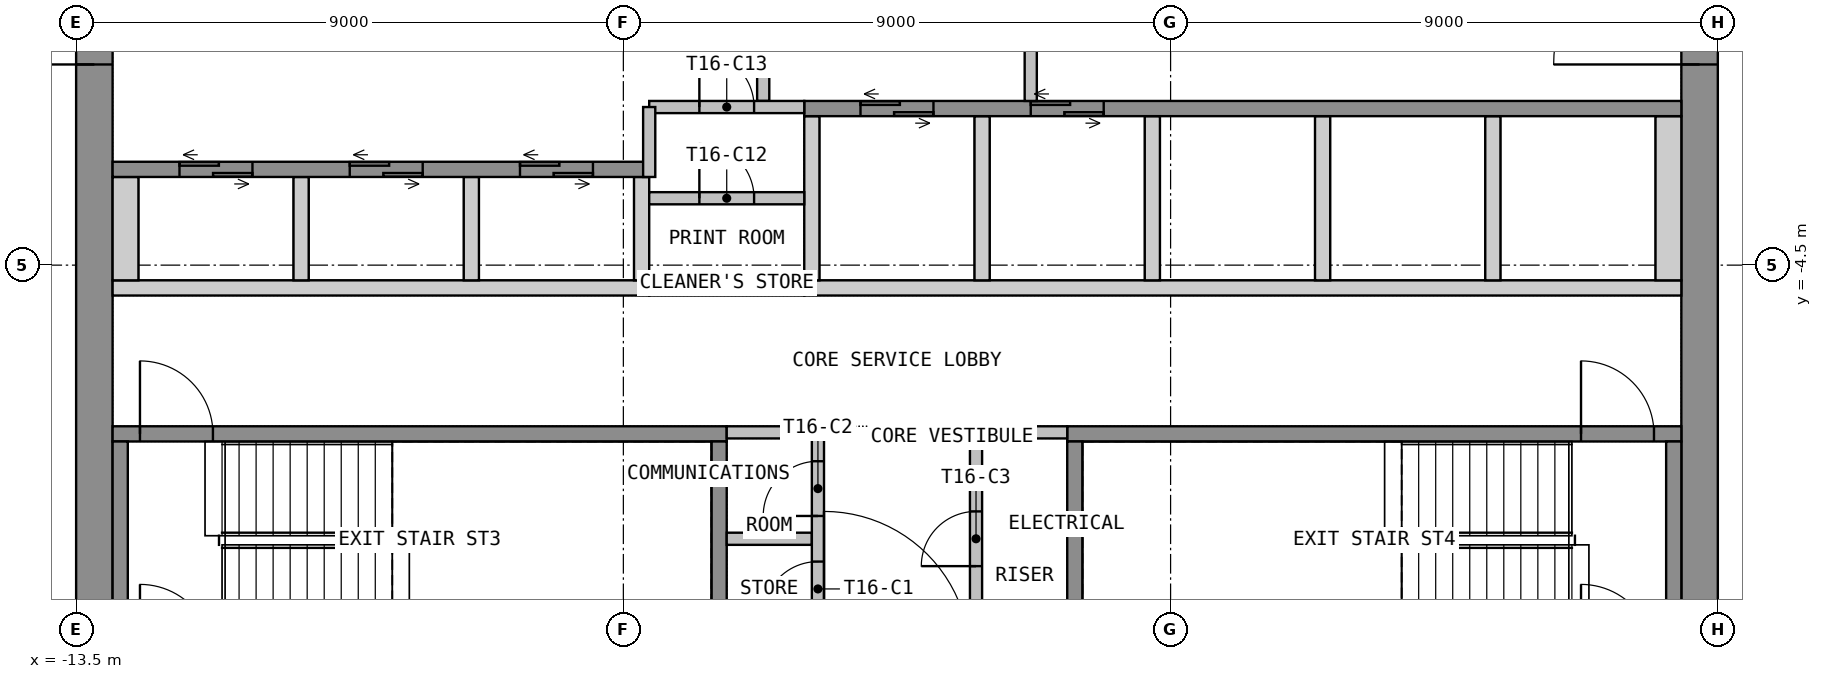
"""IFC4 building model, lengths in metres.
Left out: names, types, materials, properties, quantities, classifications, styles, units other than length and angle.
Written with IfcOpenShell. Run it as: python <this file> out.ifc"""

import sys

from ifc_helpers import new_model, si_unit, direction, frame, frame_2d, origin, place, context, subcontext, project, spatial, polyline, rectangle, outline, extrude, element, fill, save


model = new_model("IFC4")
c1 = context("Model", 3, precision=1e-05, world=origin(), true_north=direction((0.0, 1.0)))
c2 = subcontext(c1, "Body", "Model", "MODEL_VIEW")
j1 = project(units=[si_unit("LENGTHUNIT", "METRE"), si_unit("PLANEANGLEUNIT", "RADIAN")], contexts=[c1])
p1 = place(None, origin())
s1 = spatial("IfcSite", under=j1, at=p1, CompositionType="ELEMENT")
p2 = place(p1, origin())
s2 = spatial("IfcBuilding", under=s1, at=p2, CompositionType="ELEMENT")
p3 = place(p2, frame((0.0, 0.0, 219.0)))
s3 = spatial("IfcBuildingStorey", under=s2, at=p3, CompositionType="ELEMENT", Elevation=219.0)
p4 = place(p3, frame((-13.2, -10.65, 0.0), z_axis=(0.0, 0.0, 1.0), x_axis=(0.0, 1.0, 0.0)))
e1 = element("IfcWall", 1, at=p4, inside=s3, PredefinedType="SHEAR", context=c2, shape_type="SweptSolid", body=[
    extrude(rectangle(XDim=21.3, YDim=0.6, at=frame_2d((10.65, 0.0))), origin(), (0.0, 0.0, 1.0), 3.55),
])
p5 = place(p4, frame((9.45, 0.0, 0.0)))
e2 = element("IfcOpeningElement", 2, at=p5, cuts=e1, PredefinedType="OPENING", context=c2, shape_type="SweptSolid", body=[
    extrude(rectangle(XDim=2.4, YDim=2.1, at=frame_2d((1.2, 1.05))), frame((0.0, 0.31, 0.0), z_axis=(0.0, -1.0, 0.0), x_axis=(1.0, 0.0, 0.0)), (0.0, 0.0, 1.0), 0.62),
])
p6 = place(p3, frame((13.2, -10.65, 0.0), z_axis=(0.0, 0.0, 1.0), x_axis=(0.0, 1.0, 0.0)))
e3 = element("IfcWall", 3, at=p6, inside=s3, PredefinedType="SHEAR", context=c2, shape_type="SweptSolid", body=[
    extrude(rectangle(XDim=21.3, YDim=0.6, at=frame_2d((10.65, 0.0))), origin(), (0.0, 0.0, 1.0), 3.55),
])
p7 = place(p6, frame((9.45, 0.0, 0.0)))
e4 = element("IfcOpeningElement", 4, at=p7, cuts=e3, PredefinedType="OPENING", context=c2, shape_type="SweptSolid", body=[
    extrude(rectangle(XDim=2.4, YDim=2.1, at=frame_2d((1.2, 1.05))), frame((0.0, 0.31, 0.0), z_axis=(0.0, -1.0, 0.0), x_axis=(1.0, 0.0, 0.0)), (0.0, 0.0, 1.0), 0.62),
])
p8 = place(p3, origin())
e5 = element("IfcWall", 5, at=p8, inside=s3, PredefinedType="SHEAR", context=c2, shape_type="SweptSolid", body=[
    extrude(outline(polyline([(-12.9, -5.0), (-4.075, -5.0), (-4.075, -4.75), (-12.9, -4.75), (-12.9, -5.0)])), origin(), (0.0, 0.0, 1.0), 3.55),
])
p9 = place(p3, origin())
e6 = element("IfcWall", 6, at=p9, inside=s3, PredefinedType="SHEAR", context=c2, shape_type="SweptSolid", body=[
    extrude(outline(polyline([(-1.525, -5.0), (12.9, -5.0), (12.9, -4.75), (-1.525, -4.75), (-1.525, -5.0)])), origin(), (0.0, 0.0, 1.0), 3.55),
])
p10 = place(p3, origin())
e7 = element("IfcWall", 7, at=p10, inside=s3, PredefinedType="SHEAR", context=c2, shape_type="SweptSolid", body=[
    extrude(outline(polyline([(-12.9, -4.75), (-12.475, -4.75), (-12.475, -3.05), (-12.9, -3.05), (-12.9, -4.75)])), origin(), (0.0, 0.0, 1.0), 3.55),
])
p11 = place(p3, origin())
e8 = element("IfcWall", 8, at=p11, inside=s3, PredefinedType="SHEAR", context=c2, shape_type="SweptSolid", body=[
    extrude(outline(polyline([(-9.925, -4.75), (-9.675, -4.75), (-9.675, -3.05), (-9.925, -3.05), (-9.925, -4.75)])), origin(), (0.0, 0.0, 1.0), 3.55),
])
p12 = place(p3, origin())
e9 = element("IfcWall", 9, at=p12, inside=s3, PredefinedType="SHEAR", context=c2, shape_type="SweptSolid", body=[
    extrude(outline(polyline([(-7.125, -4.75), (-6.875, -4.75), (-6.875, -3.05), (-7.125, -3.05), (-7.125, -4.75)])), origin(), (0.0, 0.0, 1.0), 3.55),
])
p13 = place(p3, origin())
e10 = element("IfcWall", 10, at=p13, inside=s3, PredefinedType="SHEAR", context=c2, shape_type="SweptSolid", body=[
    extrude(outline(polyline([(-4.325, -4.75), (-4.075, -4.75), (-4.075, -3.05), (-4.325, -3.05), (-4.325, -4.75)])), origin(), (0.0, 0.0, 1.0), 3.55),
])
p14 = place(p3, origin())
e11 = element("IfcWall", 11, at=p14, inside=s3, PredefinedType="SHEAR", context=c2, shape_type="SweptSolid", body=[
    extrude(outline(polyline([(-1.525, -4.75), (-1.275, -4.75), (-1.275, -2.05), (-1.525, -2.05), (-1.525, -4.75)])), origin(), (0.0, 0.0, 1.0), 3.55),
])
p15 = place(p3, origin())
e12 = element("IfcWall", 12, at=p15, inside=s3, PredefinedType="SHEAR", context=c2, shape_type="SweptSolid", body=[
    extrude(outline(polyline([(1.275, -4.75), (1.525, -4.75), (1.525, -2.05), (1.275, -2.05), (1.275, -4.75)])), origin(), (0.0, 0.0, 1.0), 3.55),
])
p16 = place(p3, origin())
e13 = element("IfcWall", 13, at=p16, inside=s3, PredefinedType="SHEAR", context=c2, shape_type="SweptSolid", body=[
    extrude(outline(polyline([(4.075, -4.75), (4.325, -4.75), (4.325, -2.05), (4.075, -2.05), (4.075, -4.75)])), origin(), (0.0, 0.0, 1.0), 3.55),
])
p17 = place(p3, origin())
e14 = element("IfcWall", 14, at=p17, inside=s3, PredefinedType="SHEAR", context=c2, shape_type="SweptSolid", body=[
    extrude(outline(polyline([(6.875, -4.75), (7.125, -4.75), (7.125, -2.05), (6.875, -2.05), (6.875, -4.75)])), origin(), (0.0, 0.0, 1.0), 3.55),
])
p18 = place(p3, origin())
e15 = element("IfcWall", 15, at=p18, inside=s3, PredefinedType="SHEAR", context=c2, shape_type="SweptSolid", body=[
    extrude(outline(polyline([(9.675, -4.75), (9.925, -4.75), (9.925, -2.05), (9.675, -2.05), (9.675, -4.75)])), origin(), (0.0, 0.0, 1.0), 3.55),
])
p19 = place(p3, origin())
e16 = element("IfcWall", 16, at=p19, inside=s3, PredefinedType="SHEAR", context=c2, shape_type="SweptSolid", body=[
    extrude(outline(polyline([(12.475, -4.75), (12.9, -4.75), (12.9, -2.05), (12.475, -2.05), (12.475, -4.75)])), origin(), (0.0, 0.0, 1.0), 3.55),
])
p20 = place(p3, frame((-12.9, -2.925, 0.0), z_axis=(0.0, 0.0, 1.0), x_axis=(1.0, 0.0, 0.0)))
e17 = element("IfcWall", 17, at=p20, inside=s3, PredefinedType="SHEAR", context=c2, shape_type="SweptSolid", body=[
    extrude(rectangle(XDim=8.825, YDim=0.25, at=frame_2d((4.413, 0.0))), origin(), (0.0, 0.0, 1.0), 3.55),
])
p21 = place(p20, frame((1.1, 0.0, 0.0)))
e18 = element("IfcOpeningElement", 18, at=p21, cuts=e17, PredefinedType="OPENING", context=c2, shape_type="SweptSolid", body=[
    extrude(rectangle(XDim=1.2, YDim=2.1, at=frame_2d((0.6, 1.05))), frame((0.0, 0.135, 0.0), z_axis=(0.0, -1.0, 0.0), x_axis=(1.0, 0.0, 0.0)), (0.0, 0.0, 1.0), 0.27),
])
p22 = place(p20, frame((3.9, 0.0, 0.0)))
e19 = element("IfcOpeningElement", 19, at=p22, cuts=e17, PredefinedType="OPENING", context=c2, shape_type="SweptSolid", body=[
    extrude(rectangle(XDim=1.2, YDim=2.1, at=frame_2d((0.6, 1.05))), frame((0.0, 0.135, 0.0), z_axis=(0.0, -1.0, 0.0), x_axis=(1.0, 0.0, 0.0)), (0.0, 0.0, 1.0), 0.27),
])
p23 = place(p20, frame((6.7, 0.0, 0.0)))
e20 = element("IfcOpeningElement", 20, at=p23, cuts=e17, PredefinedType="OPENING", context=c2, shape_type="SweptSolid", body=[
    extrude(rectangle(XDim=1.2, YDim=2.1, at=frame_2d((0.6, 1.05))), frame((0.0, 0.135, 0.0), z_axis=(0.0, -1.0, 0.0), x_axis=(1.0, 0.0, 0.0)), (0.0, 0.0, 1.0), 0.27),
])
p24 = place(p3, frame((-1.525, -1.925, 0.0), z_axis=(0.0, 0.0, 1.0), x_axis=(1.0, 0.0, 0.0)))
e21 = element("IfcWall", 21, at=p24, inside=s3, PredefinedType="SHEAR", context=c2, shape_type="SweptSolid", body=[
    extrude(rectangle(XDim=14.425, YDim=0.25, at=frame_2d((7.212, 0.0))), origin(), (0.0, 0.0, 1.0), 3.55),
])
p25 = place(p24, frame((0.925, 0.0, 0.0)))
e22 = element("IfcOpeningElement", 22, at=p25, cuts=e21, PredefinedType="OPENING", context=c2, shape_type="SweptSolid", body=[
    extrude(rectangle(XDim=1.2, YDim=2.1, at=frame_2d((0.6, 1.05))), frame((0.0, 0.135, 0.0), z_axis=(0.0, -1.0, 0.0), x_axis=(1.0, 0.0, 0.0)), (0.0, 0.0, 1.0), 0.27),
])
p26 = place(p24, frame((3.725, 0.0, 0.0)))
e23 = element("IfcOpeningElement", 23, at=p26, cuts=e21, PredefinedType="OPENING", context=c2, shape_type="SweptSolid", body=[
    extrude(rectangle(XDim=1.2, YDim=2.1, at=frame_2d((0.6, 1.05))), frame((0.0, 0.135, 0.0), z_axis=(0.0, -1.0, 0.0), x_axis=(1.0, 0.0, 0.0)), (0.0, 0.0, 1.0), 0.27),
])
p27 = place(p3, frame((-2.2, -1.8, 0.0), z_axis=(0.0, 0.0, 1.0), x_axis=(0.0, 1.0, 0.0)))
e24 = element("IfcWall", 24, at=p27, inside=s3, PredefinedType="PARTITIONING", context=c2, shape_type="SweptSolid", body=[
    extrude(rectangle(XDim=3.6, YDim=0.2, at=frame_2d((1.8, 0.0))), origin(), (0.0, 0.0, 1.0), 3.55),
])
p28 = place(p27, frame((1.2, 0.0, 0.0)))
e25 = element("IfcOpeningElement", 25, at=p28, cuts=e24, PredefinedType="OPENING", context=c2, shape_type="SweptSolid", body=[
    extrude(rectangle(XDim=1.2, YDim=2.1, at=frame_2d((0.6, 1.05))), frame((0.0, 0.11, 0.0), z_axis=(0.0, -1.0, 0.0), x_axis=(1.0, 0.0, 0.0)), (0.0, 0.0, 1.0), 0.22),
])
p29 = place(p3, frame((2.2, -1.8, 0.0), z_axis=(0.0, 0.0, 1.0), x_axis=(0.0, 1.0, 0.0)))
e26 = element("IfcWall", 26, at=p29, inside=s3, PredefinedType="PARTITIONING", context=c2, shape_type="SweptSolid", body=[
    extrude(rectangle(XDim=3.6, YDim=0.2, at=frame_2d((1.8, 0.0))), origin(), (0.0, 0.0, 1.0), 3.55),
])
p30 = place(p29, frame((1.2, 0.0, 0.0)))
e27 = element("IfcOpeningElement", 27, at=p30, cuts=e26, PredefinedType="OPENING", context=c2, shape_type="SweptSolid", body=[
    extrude(rectangle(XDim=1.2, YDim=2.1, at=frame_2d((0.6, 1.05))), frame((0.0, 0.11, 0.0), z_axis=(0.0, -1.0, 0.0), x_axis=(1.0, 0.0, 0.0)), (0.0, 0.0, 1.0), 0.22),
])
p31 = place(p3, frame((-12.9, -7.275, 0.0), z_axis=(0.0, 0.0, 1.0), x_axis=(1.0, 0.0, 0.0)))
e28 = element("IfcWall", 28, at=p31, inside=s3, PredefinedType="SHEAR", context=c2, shape_type="SweptSolid", body=[
    extrude(rectangle(XDim=10.1, YDim=0.25, at=frame_2d((5.05, 0.0))), origin(), (0.0, 0.0, 1.0), 3.55),
])
p32 = place(p31, frame((0.45, 0.0, 0.0)))
e29 = element("IfcOpeningElement", 29, at=p32, cuts=e28, PredefinedType="OPENING", context=c2, shape_type="SweptSolid", body=[
    extrude(rectangle(XDim=1.2, YDim=2.1, at=frame_2d((0.6, 1.05))), frame((0.0, 0.135, 0.0), z_axis=(0.0, -1.0, 0.0), x_axis=(1.0, 0.0, 0.0)), (0.0, 0.0, 1.0), 0.27),
])
for number, where, z_axis, x_axis in (
    (30, (-12.775, -10.65, 0.0), (0.0, 0.0, 1.0), (0.0, 1.0, 0.0)),
    (31, (-2.925, -10.65, 0.0), (0.0, 0.0, 1.0), (0.0, 1.0, 0.0)),
):
    element("IfcWall", number, at=place(p3, frame(where, z_axis=z_axis, x_axis=x_axis)), inside=s3, PredefinedType="SHEAR", context=c2, shape_type="SweptSolid", body=[
        extrude(rectangle(XDim=3.25, YDim=0.25, at=frame_2d((1.625, 0.0))), origin(), (0.0, 0.0, 1.0), 3.55),
    ])
p33 = place(p3, frame((2.8, -7.275, 0.0), z_axis=(0.0, 0.0, 1.0), x_axis=(1.0, 0.0, 0.0)))
e32 = element("IfcWall", 32, at=p33, inside=s3, PredefinedType="SHEAR", context=c2, shape_type="SweptSolid", body=[
    extrude(rectangle(XDim=10.1, YDim=0.25, at=frame_2d((5.05, 0.0))), origin(), (0.0, 0.0, 1.0), 3.55),
])
p34 = place(p33, frame((8.45, 0.0, 0.0)))
e33 = element("IfcOpeningElement", 33, at=p34, cuts=e32, PredefinedType="OPENING", context=c2, shape_type="SweptSolid", body=[
    extrude(rectangle(XDim=1.2, YDim=2.1, at=frame_2d((0.6, 1.05))), frame((0.0, 0.135, 0.0), z_axis=(0.0, -1.0, 0.0), x_axis=(1.0, 0.0, 0.0)), (0.0, 0.0, 1.0), 0.27),
])
for number, where, z_axis, x_axis in (
    (34, (2.925, -10.65, 0.0), (0.0, 0.0, 1.0), (0.0, 1.0, 0.0)),
    (35, (12.775, -10.65, 0.0), (0.0, 0.0, 1.0), (0.0, 1.0, 0.0)),
):
    element("IfcWall", number, at=place(p3, frame(where, z_axis=z_axis, x_axis=x_axis)), inside=s3, PredefinedType="SHEAR", context=c2, shape_type="SweptSolid", body=[
        extrude(rectangle(XDim=3.25, YDim=0.25, at=frame_2d((1.625, 0.0))), origin(), (0.0, 0.0, 1.0), 3.55),
    ])
for number, where, z_axis, x_axis in (
    (36, (-2.8, -7.25, 0.0), (0.0, 0.0, 1.0), (1.0, 0.0, 0.0)),
    (37, (-2.8, -9.0, 0.0), (0.0, 0.0, 1.0), (1.0, 0.0, 0.0)),
    (38, (1.4, -7.25, 0.0), (0.0, 0.0, 1.0), (1.0, 0.0, 0.0)),
):
    element("IfcWall", number, at=place(p3, frame(where, z_axis=z_axis, x_axis=x_axis)), inside=s3, PredefinedType="PARTITIONING", context=c2, shape_type="SweptSolid", body=[
        extrude(rectangle(XDim=1.4, YDim=0.2, at=frame_2d((0.7, 0.0))), origin(), (0.0, 0.0, 1.0), 3.55),
    ])
p35 = place(p3, frame((-1.3, -10.65, 0.0), z_axis=(0.0, 0.0, 1.0), x_axis=(0.0, 1.0, 0.0)))
e39 = element("IfcWall", 39, at=p35, inside=s3, PredefinedType="PARTITIONING", context=c2, shape_type="SweptSolid", body=[
    extrude(rectangle(XDim=3.5, YDim=0.2, at=frame_2d((1.75, 0.0))), origin(), (0.0, 0.0, 1.0), 3.55),
])
p36 = place(p35, frame((0.375, 0.0, 0.0)))
e40 = element("IfcOpeningElement", 40, at=p36, cuts=e39, PredefinedType="OPENING", context=c2, shape_type="SweptSolid", body=[
    extrude(rectangle(XDim=0.9, YDim=2.1, at=frame_2d((0.45, 1.05))), frame((0.0, 0.11, 0.0), z_axis=(0.0, -1.0, 0.0), x_axis=(1.0, 0.0, 0.0)), (0.0, 0.0, 1.0), 0.22),
])
p37 = place(p35, frame((2.025, 0.0, 0.0)))
e41 = element("IfcOpeningElement", 41, at=p37, cuts=e39, PredefinedType="OPENING", context=c2, shape_type="SweptSolid", body=[
    extrude(rectangle(XDim=0.9, YDim=2.1, at=frame_2d((0.45, 1.05))), frame((0.0, 0.11, 0.0), z_axis=(0.0, -1.0, 0.0), x_axis=(1.0, 0.0, 0.0)), (0.0, 0.0, 1.0), 0.22),
])
p38 = place(p3, frame((1.3, -10.65, 0.0), z_axis=(0.0, 0.0, 1.0), x_axis=(0.0, 1.0, 0.0)))
e42 = element("IfcWall", 42, at=p38, inside=s3, PredefinedType="PARTITIONING", context=c2, shape_type="SweptSolid", body=[
    extrude(rectangle(XDim=3.5, YDim=0.2, at=frame_2d((1.75, 0.0))), origin(), (0.0, 0.0, 1.0), 3.55),
])
p39 = place(p38, frame((1.2, 0.0, 0.0)))
e43 = element("IfcOpeningElement", 43, at=p39, cuts=e42, PredefinedType="OPENING", context=c2, shape_type="SweptSolid", body=[
    extrude(rectangle(XDim=0.9, YDim=2.1, at=frame_2d((0.45, 1.05))), frame((0.0, 0.11, 0.0), z_axis=(0.0, -1.0, 0.0), x_axis=(1.0, 0.0, 0.0)), (0.0, 0.0, 1.0), 0.22),
])
p40 = place(p3, frame((-4.075, -3.4, 0.0), z_axis=(0.0, 0.0, 1.0), x_axis=(1.0, 0.0, 0.0)))
e44 = element("IfcWall", 44, at=p40, inside=s3, PredefinedType="PARTITIONING", context=c2, shape_type="SweptSolid", body=[
    extrude(rectangle(XDim=2.55, YDim=0.2, at=frame_2d((1.275, 0.0))), origin(), (0.0, 0.0, 1.0), 3.55),
])
p41 = place(p40, frame((0.825, 0.0, 0.0)))
e45 = element("IfcOpeningElement", 45, at=p41, cuts=e44, PredefinedType="OPENING", context=c2, shape_type="SweptSolid", body=[
    extrude(rectangle(XDim=0.9, YDim=2.1, at=frame_2d((0.45, 1.05))), frame((0.0, 0.11, 0.0), z_axis=(0.0, -1.0, 0.0), x_axis=(1.0, 0.0, 0.0)), (0.0, 0.0, 1.0), 0.22),
])
p42 = place(p3, frame((-4.075, -1.9, 0.0), z_axis=(0.0, 0.0, 1.0), x_axis=(1.0, 0.0, 0.0)))
e46 = element("IfcWall", 46, at=p42, inside=s3, PredefinedType="PARTITIONING", context=c2, shape_type="SweptSolid", body=[
    extrude(rectangle(XDim=2.55, YDim=0.2, at=frame_2d((1.275, 0.0))), origin(), (0.0, 0.0, 1.0), 3.55),
])
p43 = place(p42, frame((0.825, 0.0, 0.0)))
e47 = element("IfcOpeningElement", 47, at=p43, cuts=e46, PredefinedType="OPENING", context=c2, shape_type="SweptSolid", body=[
    extrude(rectangle(XDim=0.9, YDim=2.1, at=frame_2d((0.45, 1.05))), frame((0.0, 0.11, 0.0), z_axis=(0.0, -1.0, 0.0), x_axis=(1.0, 0.0, 0.0)), (0.0, 0.0, 1.0), 0.22),
])
p44 = place(p3, frame((-4.075, -4.9, 0.0), z_axis=(0.0, 0.0, 1.0), x_axis=(1.0, 0.0, 0.0)))
e48 = element("IfcWall", 48, at=p44, inside=s3, PredefinedType="PARTITIONING", context=c2, shape_type="SweptSolid", body=[
    extrude(rectangle(XDim=2.55, YDim=0.2, at=frame_2d((1.275, 0.0))), origin(), (0.0, 0.0, 1.0), 3.55),
])
p45 = place(p3, frame((-4.075, -1.9, 0.0), z_axis=(0.0, 0.0, 1.0), x_axis=(0.0, -1.0, 0.0)))
e49 = element("IfcWall", 49, at=p45, inside=s3, PredefinedType="PARTITIONING", context=c2, shape_type="SweptSolid", body=[
    extrude(rectangle(XDim=1.15, YDim=0.2, at=frame_2d((0.575, 0.0))), origin(), (0.0, 0.0, 1.0), 3.55),
])
p46 = place(p5, origin())
e50 = element("IfcDoor", 50, at=p46, inside=s3, OperationType="DOUBLE_DOOR_DOUBLE_SWING", PredefinedType="DOOR", context=c2, shape_type="SweptSolid", body=[
    extrude(rectangle(XDim=2.4, YDim=2.1, at=frame_2d((1.2, 1.05))), frame((0.0, 0.025, 0.0), z_axis=(0.0, -1.0, 0.0), x_axis=(1.0, 0.0, 0.0)), (0.0, 0.0, 1.0), 0.05),
])
fill(e2, e50)
p47 = place(p7, origin())
e51 = element("IfcDoor", 51, at=p47, inside=s3, OperationType="DOUBLE_DOOR_DOUBLE_SWING", PredefinedType="DOOR", context=c2, shape_type="SweptSolid", body=[
    extrude(rectangle(XDim=2.4, YDim=2.1, at=frame_2d((1.2, 1.05))), frame((0.0, 0.025, 0.0), z_axis=(0.0, -1.0, 0.0), x_axis=(1.0, 0.0, 0.0)), (0.0, 0.0, 1.0), 0.05),
])
fill(e4, e51)
p48 = place(p21, origin())
e52 = element("IfcDoor", 52, at=p48, inside=s3, OperationType="DOUBLE_DOOR_SLIDING", PredefinedType="DOOR", context=c2, shape_type="SweptSolid", body=[
    extrude(rectangle(XDim=1.2, YDim=2.1, at=frame_2d((0.6, 1.05))), frame((0.0, 0.025, 0.0), z_axis=(0.0, -1.0, 0.0), x_axis=(1.0, 0.0, 0.0)), (0.0, 0.0, 1.0), 0.05),
])
fill(e18, e52)
p49 = place(p22, origin())
e53 = element("IfcDoor", 53, at=p49, inside=s3, OperationType="DOUBLE_DOOR_SLIDING", PredefinedType="DOOR", context=c2, shape_type="SweptSolid", body=[
    extrude(rectangle(XDim=1.2, YDim=2.1, at=frame_2d((0.6, 1.05))), frame((0.0, 0.025, 0.0), z_axis=(0.0, -1.0, 0.0), x_axis=(1.0, 0.0, 0.0)), (0.0, 0.0, 1.0), 0.05),
])
fill(e19, e53)
p50 = place(p23, origin())
e54 = element("IfcDoor", 54, at=p50, inside=s3, OperationType="DOUBLE_DOOR_SLIDING", PredefinedType="DOOR", context=c2, shape_type="SweptSolid", body=[
    extrude(rectangle(XDim=1.2, YDim=2.1, at=frame_2d((0.6, 1.05))), frame((0.0, 0.025, 0.0), z_axis=(0.0, -1.0, 0.0), x_axis=(1.0, 0.0, 0.0)), (0.0, 0.0, 1.0), 0.05),
])
fill(e20, e54)
p51 = place(p25, origin())
e55 = element("IfcDoor", 55, at=p51, inside=s3, OperationType="DOUBLE_DOOR_SLIDING", PredefinedType="DOOR", context=c2, shape_type="SweptSolid", body=[
    extrude(rectangle(XDim=1.2, YDim=2.1, at=frame_2d((0.6, 1.05))), frame((0.0, 0.025, 0.0), z_axis=(0.0, -1.0, 0.0), x_axis=(1.0, 0.0, 0.0)), (0.0, 0.0, 1.0), 0.05),
])
fill(e22, e55)
p52 = place(p26, origin())
e56 = element("IfcDoor", 56, at=p52, inside=s3, OperationType="DOUBLE_DOOR_SLIDING", PredefinedType="DOOR", context=c2, shape_type="SweptSolid", body=[
    extrude(rectangle(XDim=1.2, YDim=2.1, at=frame_2d((0.6, 1.05))), frame((0.0, 0.025, 0.0), z_axis=(0.0, -1.0, 0.0), x_axis=(1.0, 0.0, 0.0)), (0.0, 0.0, 1.0), 0.05),
])
fill(e23, e56)
p53 = place(p32, origin())
e57 = element("IfcDoor", 57, at=p53, inside=s3, OperationType="SINGLE_SWING_LEFT", PredefinedType="DOOR", context=c2, shape_type="SweptSolid", body=[
    extrude(rectangle(XDim=1.2, YDim=2.1, at=frame_2d((0.6, 1.05))), frame((0.0, 0.025, 0.0), z_axis=(0.0, -1.0, 0.0), x_axis=(1.0, 0.0, 0.0)), (0.0, 0.0, 1.0), 0.05),
])
fill(e29, e57)
p54 = place(p34, origin())
e58 = element("IfcDoor", 58, at=p54, inside=s3, OperationType="SINGLE_SWING_LEFT", PredefinedType="DOOR", context=c2, shape_type="SweptSolid", body=[
    extrude(rectangle(XDim=1.2, YDim=2.1, at=frame_2d((0.6, 1.05))), frame((0.0, 0.025, 0.0), z_axis=(0.0, -1.0, 0.0), x_axis=(1.0, 0.0, 0.0)), (0.0, 0.0, 1.0), 0.05),
])
fill(e33, e58)
p55 = place(p36, origin())
e59 = element("IfcDoor", 59, at=p55, inside=s3, OperationType="SINGLE_SWING_LEFT", PredefinedType="DOOR", context=c2, shape_type="SweptSolid", body=[
    extrude(rectangle(XDim=0.9, YDim=2.1, at=frame_2d((0.45, 1.05))), frame((0.0, 0.025, 0.0), z_axis=(0.0, -1.0, 0.0), x_axis=(1.0, 0.0, 0.0)), (0.0, 0.0, 1.0), 0.05),
])
fill(e40, e59)
p56 = place(p37, origin())
e60 = element("IfcDoor", 60, at=p56, inside=s3, OperationType="SINGLE_SWING_LEFT", PredefinedType="DOOR", context=c2, shape_type="SweptSolid", body=[
    extrude(rectangle(XDim=0.9, YDim=2.1, at=frame_2d((0.45, 1.05))), frame((0.0, 0.025, 0.0), z_axis=(0.0, -1.0, 0.0), x_axis=(1.0, 0.0, 0.0)), (0.0, 0.0, 1.0), 0.05),
])
fill(e41, e60)
p57 = place(p39, origin())
e61 = element("IfcDoor", 61, at=p57, inside=s3, OperationType="SINGLE_SWING_LEFT", PredefinedType="DOOR", context=c2, shape_type="SweptSolid", body=[
    extrude(rectangle(XDim=0.9, YDim=2.1, at=frame_2d((0.45, 1.05))), frame((0.0, 0.025, 0.0), z_axis=(0.0, -1.0, 0.0), x_axis=(1.0, 0.0, 0.0)), (0.0, 0.0, 1.0), 0.05),
])
fill(e43, e61)
p58 = place(p41, origin())
e62 = element("IfcDoor", 62, at=p58, inside=s3, OperationType="SINGLE_SWING_LEFT", PredefinedType="DOOR", context=c2, shape_type="SweptSolid", body=[
    extrude(rectangle(XDim=0.9, YDim=2.1, at=frame_2d((0.45, 1.05))), frame((0.0, 0.025, 0.0), z_axis=(0.0, -1.0, 0.0), x_axis=(1.0, 0.0, 0.0)), (0.0, 0.0, 1.0), 0.05),
])
fill(e45, e62)
p59 = place(p43, origin())
e63 = element("IfcDoor", 63, at=p59, inside=s3, OperationType="SINGLE_SWING_LEFT", PredefinedType="DOOR", context=c2, shape_type="SweptSolid", body=[
    extrude(rectangle(XDim=0.9, YDim=2.1, at=frame_2d((0.45, 1.05))), frame((0.0, 0.025, 0.0), z_axis=(0.0, -1.0, 0.0), x_axis=(1.0, 0.0, 0.0)), (0.0, 0.0, 1.0), 0.05),
])
fill(e47, e63)
save(model, sys.argv[1])
